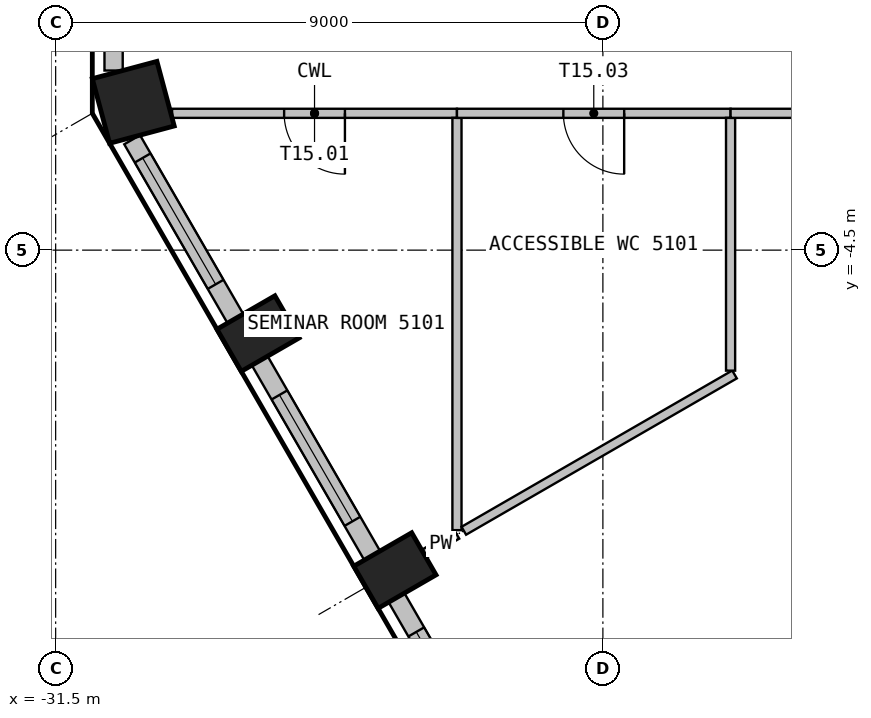
"""IFC4 building model, lengths in metres.
Left out: names, types, materials, properties, quantities, classifications, styles, units other than length and angle.
Written with IfcOpenShell. Run it as: python <this file> out.ifc"""

import sys

from ifc_helpers import new_model, si_unit, direction, frame, frame_2d, origin, origin_2d, place, context, subcontext, project, spatial, rectangle, extrude, element, fill, save


model = new_model("IFC4")
c1 = context("Model", 3, precision=1e-05, world=origin(), true_north=direction((0.0, 1.0)))
c2 = subcontext(c1, "Body", "Model", "MODEL_VIEW")
j1 = project(units=[si_unit("LENGTHUNIT", "METRE"), si_unit("PLANEANGLEUNIT", "RADIAN")], contexts=[c1])
p1 = place(None, origin())
s1 = spatial("IfcSite", under=j1, at=p1, CompositionType="ELEMENT")
p2 = place(p1, origin())
s2 = spatial("IfcBuilding", under=s1, at=p2, CompositionType="ELEMENT")
p3 = place(p2, frame((0.0, 0.0, 207.3)))
s3 = spatial("IfcBuildingStorey", under=s2, at=p3, CompositionType="ELEMENT", Elevation=207.3)
p4 = place(p3, frame((-30.223, -2.07, 0.0), z_axis=(0.0, 0.0, 1.0), x_axis=(0.258819045103, -0.965925826289, 0.0)))
e1 = element("IfcColumn", 1, at=p4, inside=s3, PredefinedType="COLUMN", context=c2, shape_type="SweptSolid", body=[
    extrude(rectangle(XDim=1.1, YDim=1.1, at=origin_2d()), origin(), (0.0, 0.0, 1.0), 3.55),
])
for number, where, z_axis, x_axis in (
    (2, (-28.171, -5.872, 0.0), (0.0, 0.0, 1.0), (0.5, -0.866, 0.0)),
    (3, (-25.921, -9.769, 0.0), (0.0, 0.0, 1.0), (0.5, -0.866, 0.0)),
):
    element("IfcColumn", number, at=place(p3, frame(where, z_axis=z_axis, x_axis=x_axis)), inside=s3, PredefinedType="COLUMN", context=c2, shape_type="SweptSolid", body=[
        extrude(rectangle(XDim=0.8, YDim=1.1, at=origin_2d()), origin(), (0.0, 0.0, 1.0), 3.55),
    ])
p5 = place(p3, frame((-30.547, 1.546, 0.0), z_axis=(0.0, 0.0, 1.0), x_axis=(0.0, -1.0, 0.0)))
e4 = element("IfcWall", 4, at=p5, inside=s3, PredefinedType="SOLIDWALL", context=c2, shape_type="SweptSolid", body=[
    extrude(rectangle(XDim=3.093, YDim=0.3, at=frame_2d((1.546, 0.0))), origin(), (0.0, 0.0, 1.0), 3.55),
])
p6 = place(p5, frame((0.346, 0.0, 0.9)))
e5 = element("IfcOpeningElement", 5, at=p6, cuts=e4, PredefinedType="OPENING", context=c2, shape_type="SweptSolid", body=[
    extrude(rectangle(XDim=2.4, YDim=2.1, at=frame_2d((1.2, 1.05))), frame((0.0, 0.16, 0.0), z_axis=(0.0, -1.0, 0.0), x_axis=(1.0, 0.0, 0.0)), (0.0, 0.0, 1.0), 0.32),
])
p7 = place(p3, frame((-30.242, -2.684, 0.0), z_axis=(0.0, 0.0, 1.0), x_axis=(0.500012868213, -0.866017974191, 0.0)))
e6 = element("IfcWall", 6, at=p7, inside=s3, PredefinedType="SOLIDWALL", context=c2, shape_type="SweptSolid", body=[
    extrude(rectangle(XDim=3.396, YDim=0.3, at=frame_2d((1.698, 0.0))), origin(), (0.0, 0.0, 1.0), 3.55),
])
p8 = place(p7, frame((0.346, 0.0, 0.9)))
e7 = element("IfcOpeningElement", 7, at=p8, cuts=e6, PredefinedType="OPENING", context=c2, shape_type="SweptSolid", body=[
    extrude(rectangle(XDim=2.4, YDim=2.1, at=frame_2d((1.2, 1.05))), frame((0.0, 0.16, 0.0), z_axis=(0.0, -1.0, 0.0), x_axis=(1.0, 0.0, 0.0)), (0.0, 0.0, 1.0), 0.32),
])
p9 = place(p3, frame((-28.144, -6.319, 0.0), z_axis=(0.0, 0.0, 1.0), x_axis=(0.500029062817, -0.866008623709, 0.0)))
e8 = element("IfcWall", 8, at=p9, inside=s3, PredefinedType="SOLIDWALL", context=c2, shape_type="SweptSolid", body=[
    extrude(rectangle(XDim=3.699, YDim=0.3, at=frame_2d((1.85, 0.0))), origin(), (0.0, 0.0, 1.0), 3.55),
])
p10 = place(p9, frame((0.649, 0.0, 0.9)))
e9 = element("IfcOpeningElement", 9, at=p10, cuts=e8, PredefinedType="OPENING", context=c2, shape_type="SweptSolid", body=[
    extrude(rectangle(XDim=2.4, YDim=2.1, at=frame_2d((1.2, 1.05))), frame((0.0, 0.16, 0.0), z_axis=(0.0, -1.0, 0.0), x_axis=(1.0, 0.0, 0.0)), (0.0, 0.0, 1.0), 0.32),
])
p11 = place(p3, frame((-25.894, -10.216, 0.0), z_axis=(0.0, 0.0, 1.0), x_axis=(0.500029062817, -0.866008623709, 0.0)))
e10 = element("IfcWall", 10, at=p11, inside=s3, PredefinedType="SOLIDWALL", context=c2, shape_type="SweptSolid", body=[
    extrude(rectangle(XDim=3.699, YDim=0.3, at=frame_2d((1.85, 0.0))), origin(), (0.0, 0.0, 1.0), 3.55),
])
p12 = place(p11, frame((0.649, 0.0, 0.9)))
e11 = element("IfcOpeningElement", 11, at=p12, cuts=e10, PredefinedType="OPENING", context=c2, shape_type="SweptSolid", body=[
    extrude(rectangle(XDim=2.4, YDim=2.1, at=frame_2d((1.2, 1.05))), frame((0.0, 0.16, 0.0), z_axis=(0.0, -1.0, 0.0), x_axis=(1.0, 0.0, 0.0)), (0.0, 0.0, 1.0), 0.32),
])
p13 = place(p3, frame((-24.9, -2.25, 0.0), z_axis=(0.0, 0.0, 1.0), x_axis=(-1.0, 0.0, 0.0)))
e12 = element("IfcWall", 12, at=p13, inside=s3, PredefinedType="PARTITIONING", context=c2, shape_type="SweptSolid", body=[
    extrude(rectangle(XDim=4.685, YDim=0.15, at=frame_2d((2.343, 0.0))), origin(), (0.0, 0.0, 1.0), 3.55),
])
p14 = place(p13, frame((1.843, 0.0, 0.0)))
e13 = element("IfcOpeningElement", 13, at=p14, cuts=e12, PredefinedType="OPENING", context=c2, shape_type="SweptSolid", body=[
    extrude(rectangle(XDim=1.0, YDim=2.1, at=frame_2d((0.5, 1.05))), frame((0.0, 0.085, 0.0), z_axis=(0.0, -1.0, 0.0), x_axis=(1.0, 0.0, 0.0)), (0.0, 0.0, 1.0), 0.17),
])
p15 = place(p3, frame((-24.9, -9.18, 0.0), z_axis=(0.0, 0.0, 1.0), x_axis=(-0.86593842012, -0.50015062987, 0.0)))
e14 = element("IfcWall", 14, at=p15, inside=s3, PredefinedType="PARTITIONING", context=c2, shape_type="SweptSolid", body=[
    extrude(rectangle(XDim=0.609, YDim=0.15, at=frame_2d((0.304, 0.0))), origin(), (0.0, 0.0, 1.0), 3.55),
])
p16 = place(p3, frame((-24.9, -2.325, 0.0), z_axis=(0.0, 0.0, 1.0), x_axis=(0.0, -1.0, 0.0)))
e15 = element("IfcWall", 15, at=p16, inside=s3, PredefinedType="PARTITIONING", context=c2, shape_type="SweptSolid", body=[
    extrude(rectangle(XDim=6.78, YDim=0.15, at=frame_2d((3.39, 0.0))), origin(), (0.0, 0.0, 1.0), 3.55),
])
p17 = place(p3, frame((-20.335, -6.544, 0.0), z_axis=(0.0, 0.0, 1.0), x_axis=(-0.86602821796, -0.499995125673, 0.0)))
e16 = element("IfcWall", 16, at=p17, inside=s3, PredefinedType="PARTITIONING", context=c2, shape_type="SweptSolid", body=[
    extrude(rectangle(XDim=5.141, YDim=0.15, at=frame_2d((2.571, 0.0))), origin(), (0.0, 0.0, 1.0), 3.55),
])
p18 = place(p3, frame((-20.4, -2.25, 0.0), z_axis=(0.0, 0.0, 1.0), x_axis=(-1.0, 0.0, 0.0)))
e17 = element("IfcWall", 17, at=p18, inside=s3, PredefinedType="PARTITIONING", context=c2, shape_type="SweptSolid", body=[
    extrude(rectangle(XDim=4.5, YDim=0.15, at=frame_2d((2.25, 0.0))), origin(), (0.0, 0.0, 1.0), 3.55),
])
p19 = place(p18, frame((1.75, 0.0, 0.0)))
e18 = element("IfcOpeningElement", 18, at=p19, cuts=e17, PredefinedType="OPENING", context=c2, shape_type="SweptSolid", body=[
    extrude(rectangle(XDim=1.0, YDim=2.1, at=frame_2d((0.5, 1.05))), frame((0.0, 0.085, 0.0), z_axis=(0.0, -1.0, 0.0), x_axis=(1.0, 0.0, 0.0)), (0.0, 0.0, 1.0), 0.17),
])
p20 = place(p3, frame((-20.4, -2.325, 0.0), z_axis=(0.0, 0.0, 1.0), x_axis=(0.0, -1.0, 0.0)))
e19 = element("IfcWall", 19, at=p20, inside=s3, PredefinedType="PARTITIONING", context=c2, shape_type="SweptSolid", body=[
    extrude(rectangle(XDim=4.157, YDim=0.15, at=frame_2d((2.079, 0.0))), origin(), (0.0, 0.0, 1.0), 3.55),
])
p21 = place(p3, frame((-15.825, -2.25, 0.0), z_axis=(0.0, 0.0, 1.0), x_axis=(-1.0, 0.0, 0.0)))
e20 = element("IfcWall", 20, at=p21, inside=s3, PredefinedType="PARTITIONING", context=c2, shape_type="SweptSolid", body=[
    extrude(rectangle(XDim=4.575, YDim=0.15, at=frame_2d((2.288, 0.0))), origin(), (0.0, 0.0, 1.0), 3.55),
])
p22 = place(p8, origin())
e21 = element("IfcWindow", 21, at=p22, inside=s3, PartitioningType="SINGLE_PANEL", PredefinedType="WINDOW", context=c2, shape_type="SweptSolid", body=[
    extrude(rectangle(XDim=2.4, YDim=2.1, at=frame_2d((1.2, 1.05))), frame((0.0, 0.03, 0.0), z_axis=(0.0, -1.0, 0.0), x_axis=(1.0, 0.0, 0.0)), (0.0, 0.0, 1.0), 0.06),
])
fill(e7, e21)
p23 = place(p10, origin())
e22 = element("IfcWindow", 22, at=p23, inside=s3, PartitioningType="SINGLE_PANEL", PredefinedType="WINDOW", context=c2, shape_type="SweptSolid", body=[
    extrude(rectangle(XDim=2.4, YDim=2.1, at=frame_2d((1.2, 1.05))), frame((0.0, 0.03, 0.0), z_axis=(0.0, -1.0, 0.0), x_axis=(1.0, 0.0, 0.0)), (0.0, 0.0, 1.0), 0.06),
])
fill(e9, e22)
p24 = place(p12, origin())
e23 = element("IfcWindow", 23, at=p24, inside=s3, PartitioningType="SINGLE_PANEL", PredefinedType="WINDOW", context=c2, shape_type="SweptSolid", body=[
    extrude(rectangle(XDim=2.4, YDim=2.1, at=frame_2d((1.2, 1.05))), frame((0.0, 0.03, 0.0), z_axis=(0.0, -1.0, 0.0), x_axis=(1.0, 0.0, 0.0)), (0.0, 0.0, 1.0), 0.06),
])
fill(e11, e23)
p25 = place(p14, origin())
e24 = element("IfcDoor", 24, at=p25, inside=s3, OperationType="SINGLE_SWING_RIGHT", PredefinedType="DOOR", context=c2, shape_type="SweptSolid", body=[
    extrude(rectangle(XDim=1.0, YDim=2.1, at=frame_2d((0.5, 1.05))), frame((0.0, 0.025, 0.0), z_axis=(0.0, -1.0, 0.0), x_axis=(1.0, 0.0, 0.0)), (0.0, 0.0, 1.0), 0.05),
])
fill(e13, e24)
p26 = place(p19, origin())
e25 = element("IfcDoor", 25, at=p26, inside=s3, OperationType="SINGLE_SWING_RIGHT", PredefinedType="DOOR", context=c2, shape_type="SweptSolid", body=[
    extrude(rectangle(XDim=1.0, YDim=2.1, at=frame_2d((0.5, 1.05))), frame((0.0, 0.025, 0.0), z_axis=(0.0, -1.0, 0.0), x_axis=(1.0, 0.0, 0.0)), (0.0, 0.0, 1.0), 0.05),
])
fill(e18, e25)
save(model, sys.argv[1])
